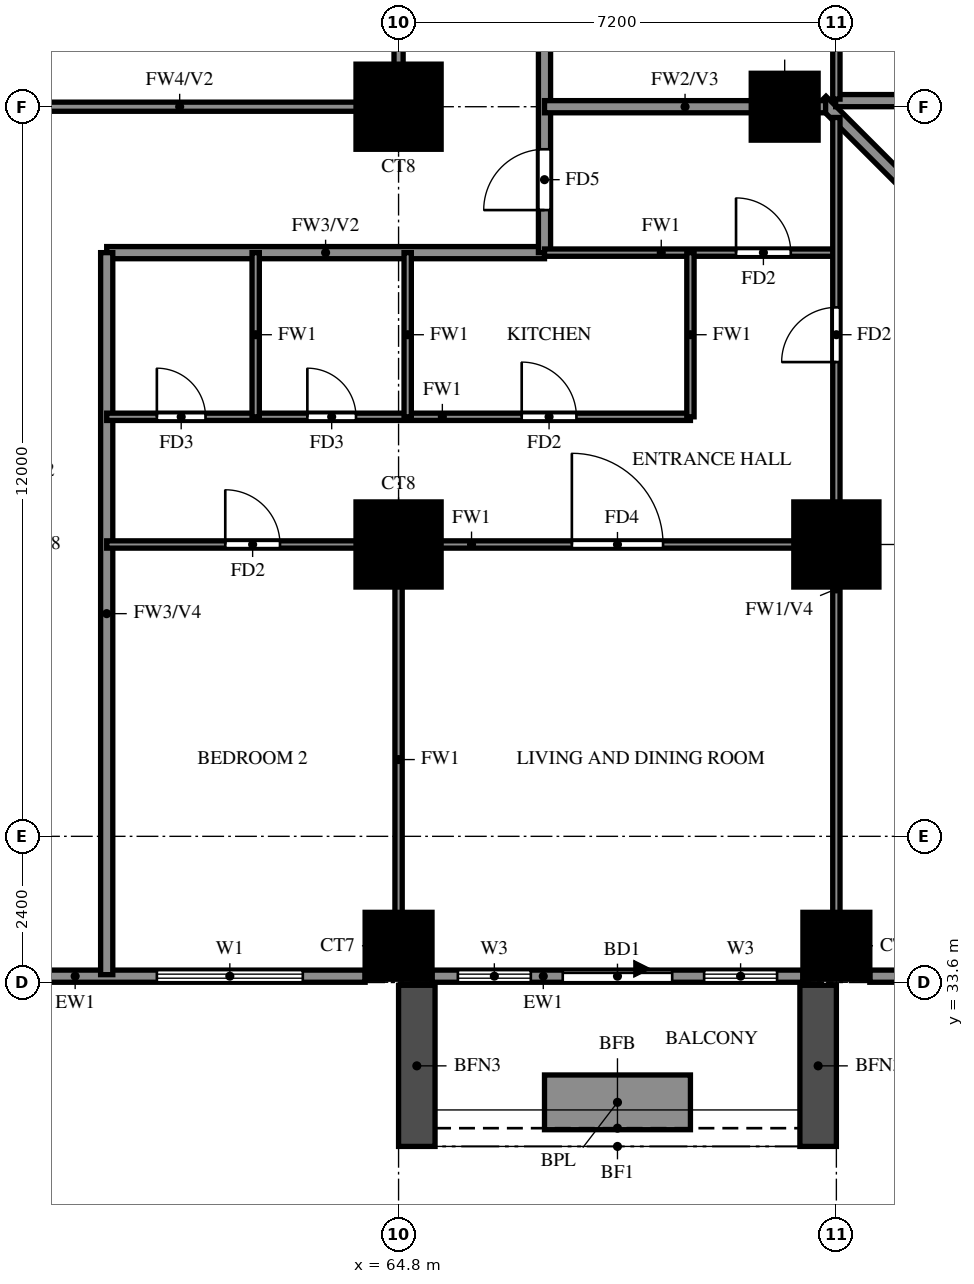
"""IFC4 building model, lengths in metres.
Left out: names, types, materials, properties, quantities, classifications, styles, units other than length and angle.
Written with IfcOpenShell. Run it as: python <this file> out.ifc"""

import sys

from ifc_helpers import new_model, si_unit, direction, frame, frame_2d, origin, origin_2d, place, context, subcontext, project, spatial, rectangle, extrude, source, transform, mapped, element, fill, save


model = new_model("IFC4")
c1 = context("Model", 3, precision=1e-05, world=origin(), true_north=direction((0.0, 1.0)))
c2 = subcontext(c1, "Body", "Model", "MODEL_VIEW")
j1 = project(units=[si_unit("LENGTHUNIT", "METRE"), si_unit("PLANEANGLEUNIT", "RADIAN")], contexts=[c1])
p1 = place(None, origin())
s1 = spatial("IfcSite", under=j1, at=p1, CompositionType="ELEMENT")
p2 = place(p1, origin())
s2 = spatial("IfcBuilding", under=s1, at=p2, CompositionType="ELEMENT")
p3 = place(p2, frame((0.0, 0.0, 44.5)))
s3 = spatial("IfcBuildingStorey", under=s2, at=p3, CompositionType="ELEMENT", Elevation=44.5)
m1 = source(origin(), c2, "Body", "SweptSolid", [
    extrude(rectangle(XDim=1.1, YDim=1.1, at=origin_2d()), origin(), (0.0, 0.0, 1.0), 3.18),
])
for number, where, z_axis, x_axis in (
    (1, (64.8, 34.2, 0.0), (0.0, 0.0, 1.0), (1.0, 0.0, 0.0)),
    (2, (72.0, 34.2, 0.0), (0.0, 0.0, 1.0), (1.0, 0.0, 0.0)),
):
    element("IfcColumn", number, at=place(p3, frame(where, z_axis=z_axis, x_axis=x_axis)), inside=s3, PredefinedType="COLUMN", context=c2, shape_type="MappedRepresentation", body=[
        mapped(m1, transform((0.0, 0.0, 0.0))),
    ])
m2 = source(origin(), c2, "Body", "SweptSolid", [
    extrude(rectangle(XDim=1.4, YDim=1.4, at=origin_2d()), origin(), (0.0, 0.0, 1.0), 3.18),
])
for number, where, z_axis, x_axis in (
    (3, (64.8, 40.8, 0.0), (0.0, 0.0, 1.0), (1.0, 0.0, 0.0)),
    (4, (72.0, 40.8, 0.0), (0.0, 0.0, 1.0), (1.0, 0.0, 0.0)),
    (5, (64.8, 48.0, 0.0), (0.0, 0.0, 1.0), (1.0, 0.0, 0.0)),
):
    element("IfcColumn", number, at=place(p3, frame(where, z_axis=z_axis, x_axis=x_axis)), inside=s3, PredefinedType="COLUMN", context=c2, shape_type="MappedRepresentation", body=[
        mapped(m2, transform((0.0, 0.0, 0.0))),
    ])
p4 = place(p3, frame((71.15, 48.0, 0.0), z_axis=(0.0, 0.0, 1.0), x_axis=(1.0, 0.0, 0.0)))
e6 = element("IfcColumn", 6, at=p4, inside=s3, PredefinedType="COLUMN", context=c2, shape_type="MappedRepresentation", body=[
    mapped(m1, transform((0.0, 0.0, 0.0))),
])
p5 = place(p3, frame((78.74, 41.118, 0.0), z_axis=(0.0, 0.0, 1.0), x_axis=(-0.707106781187, 0.707106781187, 0.0)))
e7 = element("IfcWall", 7, at=p5, inside=s3, PredefinedType="SOLIDWALL", context=c2, shape_type="SweptSolid", body=[
    extrude(rectangle(XDim=9.874, YDim=0.2, at=frame_2d((4.937, 0.0))), origin(), (0.0, 0.0, 1.0), 3.18),
])
p6 = place(p3, frame((71.989, 48.1, 0.0), z_axis=(0.0, 0.0, 1.0), x_axis=(1.0, 0.0, 0.0)))
e8 = element("IfcWall", 8, at=p6, inside=s3, PredefinedType="SOLIDWALL", context=c2, shape_type="SweptSolid", body=[
    extrude(rectangle(XDim=6.511, YDim=0.2, at=frame_2d((3.256, 0.0))), origin(), (0.0, 0.0, 1.0), 3.18),
])
p7 = place(p6, frame((2.206, 0.0, 1.5)))
e9 = element("IfcOpeningElement", 9, at=p7, cuts=e8, PredefinedType="OPENING", context=c2, shape_type="SweptSolid", body=[
    extrude(rectangle(XDim=0.9, YDim=0.9, at=frame_2d((0.45, 0.45))), frame((0.0, 0.11, 0.0), z_axis=(0.0, -1.0, 0.0), x_axis=(1.0, 0.0, 0.0)), (0.0, 0.0, 1.0), 0.22),
])
p8 = place(p3, frame((58.8, 33.7, 0.0), z_axis=(0.0, 0.0, 1.0), x_axis=(1.0, 0.0, 0.0)))
e10 = element("IfcWall", 10, at=p8, inside=s3, PredefinedType="SOLIDWALL", context=c2, shape_type="SweptSolid", body=[
    extrude(rectangle(XDim=5.45, YDim=0.2, at=frame_2d((2.725, 0.0))), origin(), (0.0, 0.0, 1.0), 3.18),
])
p9 = place(p8, frame((2.025, 0.0, 0.6)))
e11 = element("IfcOpeningElement", 11, at=p9, cuts=e10, PredefinedType="OPENING", context=c2, shape_type="SweptSolid", body=[
    extrude(rectangle(XDim=2.4, YDim=2.4, at=frame_2d((1.2, 1.2))), frame((0.0, 0.11, 0.0), z_axis=(0.0, -1.0, 0.0), x_axis=(1.0, 0.0, 0.0)), (0.0, 0.0, 1.0), 0.22),
])
p10 = place(p3, frame((65.35, 33.7, 0.0), z_axis=(0.0, 0.0, 1.0), x_axis=(1.0, 0.0, 0.0)))
e12 = element("IfcWall", 12, at=p10, inside=s3, PredefinedType="SOLIDWALL", context=c2, shape_type="SweptSolid", body=[
    extrude(rectangle(XDim=6.1, YDim=0.2, at=frame_2d((3.05, 0.0))), origin(), (0.0, 0.0, 1.0), 3.18),
])
p11 = place(p10, frame((2.15, 0.0, 0.0)))
e13 = element("IfcOpeningElement", 13, at=p11, cuts=e12, PredefinedType="OPENING", context=c2, shape_type="SweptSolid", body=[
    extrude(rectangle(XDim=1.8, YDim=2.4, at=frame_2d((0.9, 1.2))), frame((0.0, 0.11, 0.0), z_axis=(0.0, -1.0, 0.0), x_axis=(1.0, 0.0, 0.0)), (0.0, 0.0, 1.0), 0.22),
])
p12 = place(p10, frame((0.425, 0.0, 0.6)))
e14 = element("IfcOpeningElement", 14, at=p12, cuts=e12, PredefinedType="OPENING", context=c2, shape_type="SweptSolid", body=[
    extrude(rectangle(XDim=1.2, YDim=2.4, at=frame_2d((0.6, 1.2))), frame((0.0, 0.11, 0.0), z_axis=(0.0, -1.0, 0.0), x_axis=(1.0, 0.0, 0.0)), (0.0, 0.0, 1.0), 0.22),
])
p13 = place(p10, frame((4.475, 0.0, 0.6)))
e15 = element("IfcOpeningElement", 15, at=p13, cuts=e12, PredefinedType="OPENING", context=c2, shape_type="SweptSolid", body=[
    extrude(rectangle(XDim=1.2, YDim=2.4, at=frame_2d((0.6, 1.2))), frame((0.0, 0.11, 0.0), z_axis=(0.0, -1.0, 0.0), x_axis=(1.0, 0.0, 0.0)), (0.0, 0.0, 1.0), 0.22),
])
p14 = place(p3, frame((72.55, 33.7, 0.0), z_axis=(0.0, 0.0, 1.0), x_axis=(1.0, 0.0, 0.0)))
e16 = element("IfcWall", 16, at=p14, inside=s3, PredefinedType="SOLIDWALL", context=c2, shape_type="SweptSolid", body=[
    extrude(rectangle(XDim=13.609, YDim=0.2, at=frame_2d((6.804, 0.0))), origin(), (0.0, 0.0, 1.0), 3.18),
])
p15 = place(p14, frame((1.183, 0.0, 0.6)))
e17 = element("IfcOpeningElement", 17, at=p15, cuts=e16, PredefinedType="OPENING", context=c2, shape_type="SweptSolid", body=[
    extrude(rectangle(XDim=2.4, YDim=2.4, at=frame_2d((1.2, 1.2))), frame((0.0, 0.11, 0.0), z_axis=(0.0, -1.0, 0.0), x_axis=(1.0, 0.0, 0.0)), (0.0, 0.0, 1.0), 0.22),
])
p16 = place(p14, frame((4.467, 0.0, 0.6)))
e18 = element("IfcOpeningElement", 18, at=p16, cuts=e16, PredefinedType="OPENING", context=c2, shape_type="SweptSolid", body=[
    extrude(rectangle(XDim=2.4, YDim=2.4, at=frame_2d((1.2, 1.2))), frame((0.0, 0.11, 0.0), z_axis=(0.0, -1.0, 0.0), x_axis=(1.0, 0.0, 0.0)), (0.0, 0.0, 1.0), 0.22),
])
p17 = place(p14, frame((9.429, 0.0, 0.6)))
e19 = element("IfcOpeningElement", 19, at=p17, cuts=e16, PredefinedType="OPENING", context=c2, shape_type="SweptSolid", body=[
    extrude(rectangle(XDim=2.4, YDim=2.4, at=frame_2d((1.2, 1.2))), frame((0.0, 0.11, 0.0), z_axis=(0.0, -1.0, 0.0), x_axis=(1.0, 0.0, 0.0)), (0.0, 0.0, 1.0), 0.22),
])
for number, where, z_axis, x_axis in (
    (20, (65.1, 33.55, 0.0), (0.0, 0.0, 1.0), (0.0, -1.0, 0.0)),
    (21, (71.7, 33.55, 0.0), (0.0, 0.0, 1.0), (0.0, -1.0, 0.0)),
):
    element("IfcWall", number, at=place(p3, frame(where, z_axis=z_axis, x_axis=x_axis)), inside=s3, PredefinedType="SOLIDWALL", context=c2, shape_type="SweptSolid", body=[
        extrude(rectangle(XDim=2.65, YDim=0.6, at=frame_2d((1.325, 0.0))), origin(), (0.0, 0.0, 1.0), 2.85),
    ])
p18 = place(p3, frame((67.2, 31.625, 0.0), z_axis=(0.0, 0.0, 1.0), x_axis=(1.0, 0.0, 0.0)))
e22 = element("IfcWall", 22, at=p18, inside=s3, PredefinedType="SOLIDWALL", context=c2, shape_type="SweptSolid", body=[
    extrude(rectangle(XDim=2.4, YDim=0.9, at=frame_2d((1.2, 0.0))), origin(), (0.0, 0.0, 1.0), 0.9),
])
p19 = place(p3, frame((60.0, 45.6, 0.0), z_axis=(0.0, 0.0, 1.0), x_axis=(1.0, 0.0, 0.0)))
e23 = element("IfcWall", 23, at=p19, inside=s3, PredefinedType="SOLIDWALL", context=c2, shape_type="SweptSolid", body=[
    extrude(rectangle(XDim=7.2, YDim=0.2, at=frame_2d((3.6, 0.0))), origin(), (0.0, 0.0, 1.0), 3.18),
])
p20 = place(p3, frame((60.0, 33.725, 0.0), z_axis=(0.0, 0.0, 1.0), x_axis=(0.0, 1.0, 0.0)))
e24 = element("IfcWall", 24, at=p20, inside=s3, PredefinedType="SOLIDWALL", context=c2, shape_type="SweptSolid", body=[
    extrude(rectangle(XDim=11.875, YDim=0.2, at=frame_2d((5.938, 0.0))), origin(), (0.0, 0.0, 1.0), 2.28),
])
p21 = place(p3, frame((67.2, 45.6, 0.0), z_axis=(0.0, 0.0, 1.0), x_axis=(0.0, 1.0, 0.0)))
e25 = element("IfcWall", 25, at=p21, inside=s3, PredefinedType="SOLIDWALL", context=c2, shape_type="SweptSolid", body=[
    extrude(rectangle(XDim=12.0, YDim=0.2, at=frame_2d((6.0, 0.0))), origin(), (0.0, 0.0, 1.0), 3.18),
])
p22 = place(p21, frame((10.3, 0.0, 0.0)))
e26 = element("IfcOpeningElement", 26, at=p22, cuts=e25, PredefinedType="OPENING", context=c2, shape_type="SweptSolid", body=[
    extrude(rectangle(XDim=1.0, YDim=2.1, at=frame_2d((0.5, 1.05))), frame((0.0, 0.11, 0.0), z_axis=(0.0, -1.0, 0.0), x_axis=(1.0, 0.0, 0.0)), (0.0, 0.0, 1.0), 0.22),
])
p23 = place(p21, frame((0.7, 0.0, 0.0)))
e27 = element("IfcOpeningElement", 27, at=p23, cuts=e25, PredefinedType="OPENING", context=c2, shape_type="SweptSolid", body=[
    extrude(rectangle(XDim=1.0, YDim=2.1, at=frame_2d((0.5, 1.05))), frame((0.0, 0.11, 0.0), z_axis=(0.0, -1.0, 0.0), x_axis=(1.0, 0.0, 0.0)), (0.0, 0.0, 1.0), 0.22),
])
p24 = place(p3, frame((67.2, 48.0, 0.0), z_axis=(0.0, 0.0, 1.0), x_axis=(1.0, 0.0, 0.0)))
e28 = element("IfcWall", 28, at=p24, inside=s3, PredefinedType="SOLIDWALL", context=c2, shape_type="SweptSolid", body=[
    extrude(rectangle(XDim=4.623, YDim=0.2, at=frame_2d((2.312, 0.0))), origin(), (0.0, 0.0, 1.0), 3.18),
])
p25 = place(p3, frame((60.0, 40.8, 0.0), z_axis=(0.0, 0.0, 1.0), x_axis=(1.0, 0.0, 0.0)))
e29 = element("IfcWall", 29, at=p25, inside=s3, PredefinedType="PARTITIONING", context=c2, shape_type="SweptSolid", body=[
    extrude(rectangle(XDim=12.0, YDim=0.12, at=frame_2d((6.0, 0.0))), origin(), (0.0, 0.0, 1.0), 3.18),
])
p26 = place(p25, frame((7.65, 0.0, 0.0)))
e30 = element("IfcOpeningElement", 30, at=p26, cuts=e29, PredefinedType="OPENING", context=c2, shape_type="SweptSolid", body=[
    extrude(rectangle(XDim=1.5, YDim=2.1, at=frame_2d((0.75, 1.05))), frame((0.0, 0.07, 0.0), z_axis=(0.0, -1.0, 0.0), x_axis=(1.0, 0.0, 0.0)), (0.0, 0.0, 1.0), 0.14),
])
p27 = place(p25, frame((1.95, 0.0, 0.0)))
e31 = element("IfcOpeningElement", 31, at=p27, cuts=e29, PredefinedType="OPENING", context=c2, shape_type="SweptSolid", body=[
    extrude(rectangle(XDim=0.9, YDim=2.1, at=frame_2d((0.45, 1.05))), frame((0.0, 0.07, 0.0), z_axis=(0.0, -1.0, 0.0), x_axis=(1.0, 0.0, 0.0)), (0.0, 0.0, 1.0), 0.14),
])
p28 = place(p3, frame((60.0, 42.9, 0.0), z_axis=(0.0, 0.0, 1.0), x_axis=(1.0, 0.0, 0.0)))
e32 = element("IfcWall", 32, at=p28, inside=s3, PredefinedType="PARTITIONING", context=c2, shape_type="SweptSolid", body=[
    extrude(rectangle(XDim=9.6, YDim=0.12, at=frame_2d((4.8, 0.0))), origin(), (0.0, 0.0, 1.0), 3.18),
])
p29 = place(p28, frame((6.825, 0.0, 0.0)))
e33 = element("IfcOpeningElement", 33, at=p29, cuts=e32, PredefinedType="OPENING", context=c2, shape_type="SweptSolid", body=[
    extrude(rectangle(XDim=0.9, YDim=2.1, at=frame_2d((0.45, 1.05))), frame((0.0, 0.07, 0.0), z_axis=(0.0, -1.0, 0.0), x_axis=(1.0, 0.0, 0.0)), (0.0, 0.0, 1.0), 0.14),
])
p30 = place(p28, frame((3.3, 0.0, 0.0)))
e34 = element("IfcOpeningElement", 34, at=p30, cuts=e32, PredefinedType="OPENING", context=c2, shape_type="SweptSolid", body=[
    extrude(rectangle(XDim=0.8, YDim=2.1, at=frame_2d((0.4, 1.05))), frame((0.0, 0.07, 0.0), z_axis=(0.0, -1.0, 0.0), x_axis=(1.0, 0.0, 0.0)), (0.0, 0.0, 1.0), 0.14),
])
p31 = place(p28, frame((0.825, 0.0, 0.0)))
e35 = element("IfcOpeningElement", 35, at=p31, cuts=e32, PredefinedType="OPENING", context=c2, shape_type="SweptSolid", body=[
    extrude(rectangle(XDim=0.8, YDim=2.1, at=frame_2d((0.4, 1.05))), frame((0.0, 0.07, 0.0), z_axis=(0.0, -1.0, 0.0), x_axis=(1.0, 0.0, 0.0)), (0.0, 0.0, 1.0), 0.14),
])
p32 = place(p3, frame((67.2, 45.6, 0.0), z_axis=(0.0, 0.0, 1.0), x_axis=(1.0, 0.0, 0.0)))
e36 = element("IfcWall", 36, at=p32, inside=s3, PredefinedType="PARTITIONING", context=c2, shape_type="SweptSolid", body=[
    extrude(rectangle(XDim=4.8, YDim=0.12, at=frame_2d((2.4, 0.0))), origin(), (0.0, 0.0, 1.0), 3.18),
])
p33 = place(p32, frame((3.15, 0.0, 0.0)))
e37 = element("IfcOpeningElement", 37, at=p33, cuts=e36, PredefinedType="OPENING", context=c2, shape_type="SweptSolid", body=[
    extrude(rectangle(XDim=0.9, YDim=2.1, at=frame_2d((0.45, 1.05))), frame((0.0, 0.07, 0.0), z_axis=(0.0, -1.0, 0.0), x_axis=(1.0, 0.0, 0.0)), (0.0, 0.0, 1.0), 0.14),
])
p34 = place(p3, frame((62.45, 42.9, 0.0), z_axis=(0.0, 0.0, 1.0), x_axis=(0.0, 1.0, 0.0)))
e38 = element("IfcWall", 38, at=p34, inside=s3, PredefinedType="PARTITIONING", context=c2, shape_type="SweptSolid", body=[
    extrude(rectangle(XDim=2.7, YDim=0.12, at=frame_2d((1.35, 0.0))), origin(), (0.0, 0.0, 1.0), 3.18),
])
p35 = place(p3, frame((64.8, 33.725, 0.0), z_axis=(0.0, 0.0, 1.0), x_axis=(0.0, 1.0, 0.0)))
e39 = element("IfcWall", 39, at=p35, inside=s3, PredefinedType="PARTITIONING", context=c2, shape_type="SweptSolid", body=[
    extrude(rectangle(XDim=7.075, YDim=0.12, at=frame_2d((3.538, 0.0))), origin(), (0.0, 0.0, 1.0), 3.18),
])
for number, where, z_axis, x_axis in (
    (40, (64.95, 42.9, 0.0), (0.0, 0.0, 1.0), (0.0, 1.0, 0.0)),
    (41, (69.6, 42.9, 0.0), (0.0, 0.0, 1.0), (0.0, 1.0, 0.0)),
):
    element("IfcWall", number, at=place(p3, frame(where, z_axis=z_axis, x_axis=x_axis)), inside=s3, PredefinedType="PARTITIONING", context=c2, shape_type="SweptSolid", body=[
        extrude(rectangle(XDim=2.7, YDim=0.12, at=frame_2d((1.35, 0.0))), origin(), (0.0, 0.0, 1.0), 3.18),
    ])
p36 = place(p3, frame((72.0, 33.725, 0.0), z_axis=(0.0, 0.0, 1.0), x_axis=(0.0, 1.0, 0.0)))
e42 = element("IfcWall", 42, at=p36, inside=s3, PredefinedType="PARTITIONING", context=c2, shape_type="SweptSolid", body=[
    extrude(rectangle(XDim=14.098, YDim=0.12, at=frame_2d((7.049, 0.0))), origin(), (0.0, 0.0, 1.0), 2.28),
])
p37 = place(p36, frame((10.075, 0.0, 0.0)))
e43 = element("IfcOpeningElement", 43, at=p37, cuts=e42, PredefinedType="OPENING", context=c2, shape_type="SweptSolid", body=[
    extrude(rectangle(XDim=0.9, YDim=2.1, at=frame_2d((0.45, 1.05))), frame((0.0, 0.07, 0.0), z_axis=(0.0, -1.0, 0.0), x_axis=(1.0, 0.0, 0.0)), (0.0, 0.0, 1.0), 0.14),
])
p38 = place(p3, frame((72.0, 48.125, 0.0), z_axis=(0.0, 0.0, 1.0), x_axis=(0.0, 1.0, 0.0)))
e44 = element("IfcWall", 44, at=p38, inside=s3, PredefinedType="PARTITIONING", context=c2, shape_type="SweptSolid", body=[
    extrude(rectangle(XDim=7.075, YDim=0.12, at=frame_2d((3.538, 0.0))), origin(), (0.0, 0.0, 1.0), 3.18),
])
p39 = place(p3, frame((57.6, 48.0, 0.0), z_axis=(0.0, 0.0, 1.0), x_axis=(1.0, 0.0, 0.0)))
e45 = element("IfcWall", 45, at=p39, inside=s3, PredefinedType="SOLIDWALL", context=c2, shape_type="SweptSolid", body=[
    extrude(rectangle(XDim=7.2, YDim=0.15, at=frame_2d((3.6, 0.0))), origin(), (0.0, 0.0, 1.0), 2.28),
])
p40 = place(p3, frame((64.8, 48.0, 0.0), z_axis=(0.0, 0.0, 1.0), x_axis=(0.0, 1.0, 0.0)))
e46 = element("IfcWall", 46, at=p40, inside=s3, PredefinedType="SOLIDWALL", context=c2, shape_type="SweptSolid", body=[
    extrude(rectangle(XDim=14.4, YDim=0.15, at=frame_2d((7.2, 0.0))), origin(), (0.0, 0.0, 1.0), 2.28),
])
p41 = place(p9, origin())
e47 = element("IfcWindow", 47, at=p41, inside=s3, PartitioningType="DOUBLE_PANEL_VERTICAL", PredefinedType="WINDOW", context=c2, shape_type="SweptSolid", body=[
    extrude(rectangle(XDim=2.4, YDim=2.4, at=frame_2d((1.2, 1.2))), frame((0.0, 0.03, 0.0), z_axis=(0.0, -1.0, 0.0), x_axis=(1.0, 0.0, 0.0)), (0.0, 0.0, 1.0), 0.06),
])
fill(e11, e47)
p42 = place(p11, origin())
e48 = element("IfcDoor", 48, at=p42, inside=s3, OperationType="DOUBLE_DOOR_SLIDING", PredefinedType="DOOR", context=c2, shape_type="SweptSolid", body=[
    extrude(rectangle(XDim=1.8, YDim=2.4, at=frame_2d((0.9, 1.2))), frame((0.0, 0.025, 0.0), z_axis=(0.0, -1.0, 0.0), x_axis=(1.0, 0.0, 0.0)), (0.0, 0.0, 1.0), 0.05),
])
fill(e13, e48)
p43 = place(p12, origin())
e49 = element("IfcWindow", 49, at=p43, inside=s3, PartitioningType="SINGLE_PANEL", PredefinedType="WINDOW", context=c2, shape_type="SweptSolid", body=[
    extrude(rectangle(XDim=1.2, YDim=2.4, at=frame_2d((0.6, 1.2))), frame((0.0, 0.03, 0.0), z_axis=(0.0, -1.0, 0.0), x_axis=(1.0, 0.0, 0.0)), (0.0, 0.0, 1.0), 0.06),
])
fill(e14, e49)
p44 = place(p13, origin())
e50 = element("IfcWindow", 50, at=p44, inside=s3, PartitioningType="SINGLE_PANEL", PredefinedType="WINDOW", context=c2, shape_type="SweptSolid", body=[
    extrude(rectangle(XDim=1.2, YDim=2.4, at=frame_2d((0.6, 1.2))), frame((0.0, 0.03, 0.0), z_axis=(0.0, -1.0, 0.0), x_axis=(1.0, 0.0, 0.0)), (0.0, 0.0, 1.0), 0.06),
])
fill(e15, e50)
p45 = place(p33, origin())
e51 = element("IfcDoor", 51, at=p45, inside=s3, OperationType="SINGLE_SWING_RIGHT", PredefinedType="DOOR", context=c2, shape_type="SweptSolid", body=[
    extrude(rectangle(XDim=0.9, YDim=2.1, at=frame_2d((0.45, 1.05))), frame((0.0, 0.025, 0.0), z_axis=(0.0, -1.0, 0.0), x_axis=(1.0, 0.0, 0.0)), (0.0, 0.0, 1.0), 0.05),
])
fill(e37, e51)
p46 = place(p23, origin())
e52 = element("IfcDoor", 52, at=p46, inside=s3, OperationType="SINGLE_SWING_LEFT", PredefinedType="DOOR", context=c2, shape_type="SweptSolid", body=[
    extrude(rectangle(XDim=1.0, YDim=2.1, at=frame_2d((0.5, 1.05))), frame((0.0, 0.025, 0.0), z_axis=(0.0, -1.0, 0.0), x_axis=(1.0, 0.0, 0.0)), (0.0, 0.0, 1.0), 0.05),
])
fill(e27, e52)
p47 = place(p26, origin())
e53 = element("IfcDoor", 53, at=p47, inside=s3, OperationType="SINGLE_SWING_LEFT", PredefinedType="DOOR", context=c2, shape_type="SweptSolid", body=[
    extrude(rectangle(XDim=1.5, YDim=2.1, at=frame_2d((0.75, 1.05))), frame((0.0, 0.025, 0.0), z_axis=(0.0, -1.0, 0.0), x_axis=(1.0, 0.0, 0.0)), (0.0, 0.0, 1.0), 0.05),
])
fill(e30, e53)
p48 = place(p27, origin())
e54 = element("IfcDoor", 54, at=p48, inside=s3, OperationType="SINGLE_SWING_RIGHT", PredefinedType="DOOR", context=c2, shape_type="SweptSolid", body=[
    extrude(rectangle(XDim=0.9, YDim=2.1, at=frame_2d((0.45, 1.05))), frame((0.0, 0.025, 0.0), z_axis=(0.0, -1.0, 0.0), x_axis=(1.0, 0.0, 0.0)), (0.0, 0.0, 1.0), 0.05),
])
fill(e31, e54)
p49 = place(p29, origin())
e55 = element("IfcDoor", 55, at=p49, inside=s3, OperationType="SINGLE_SWING_LEFT", PredefinedType="DOOR", context=c2, shape_type="SweptSolid", body=[
    extrude(rectangle(XDim=0.9, YDim=2.1, at=frame_2d((0.45, 1.05))), frame((0.0, 0.025, 0.0), z_axis=(0.0, -1.0, 0.0), x_axis=(1.0, 0.0, 0.0)), (0.0, 0.0, 1.0), 0.05),
])
fill(e33, e55)
p50 = place(p30, origin())
e56 = element("IfcDoor", 56, at=p50, inside=s3, OperationType="SINGLE_SWING_LEFT", PredefinedType="DOOR", context=c2, shape_type="SweptSolid", body=[
    extrude(rectangle(XDim=0.8, YDim=2.1, at=frame_2d((0.4, 1.05))), frame((0.0, 0.025, 0.0), z_axis=(0.0, -1.0, 0.0), x_axis=(1.0, 0.0, 0.0)), (0.0, 0.0, 1.0), 0.05),
])
fill(e34, e56)
p51 = place(p31, origin())
e57 = element("IfcDoor", 57, at=p51, inside=s3, OperationType="SINGLE_SWING_RIGHT", PredefinedType="DOOR", context=c2, shape_type="SweptSolid", body=[
    extrude(rectangle(XDim=0.8, YDim=2.1, at=frame_2d((0.4, 1.05))), frame((0.0, 0.025, 0.0), z_axis=(0.0, -1.0, 0.0), x_axis=(1.0, 0.0, 0.0)), (0.0, 0.0, 1.0), 0.05),
])
fill(e35, e57)
p52 = place(p37, origin())
e58 = element("IfcDoor", 58, at=p52, inside=s3, OperationType="SINGLE_SWING_LEFT", PredefinedType="DOOR", context=c2, shape_type="SweptSolid", body=[
    extrude(rectangle(XDim=0.9, YDim=2.1, at=frame_2d((0.45, 1.05))), frame((0.0, 0.025, 0.0), z_axis=(0.0, -1.0, 0.0), x_axis=(1.0, 0.0, 0.0)), (0.0, 0.0, 1.0), 0.05),
])
fill(e43, e58)
save(model, sys.argv[1])
